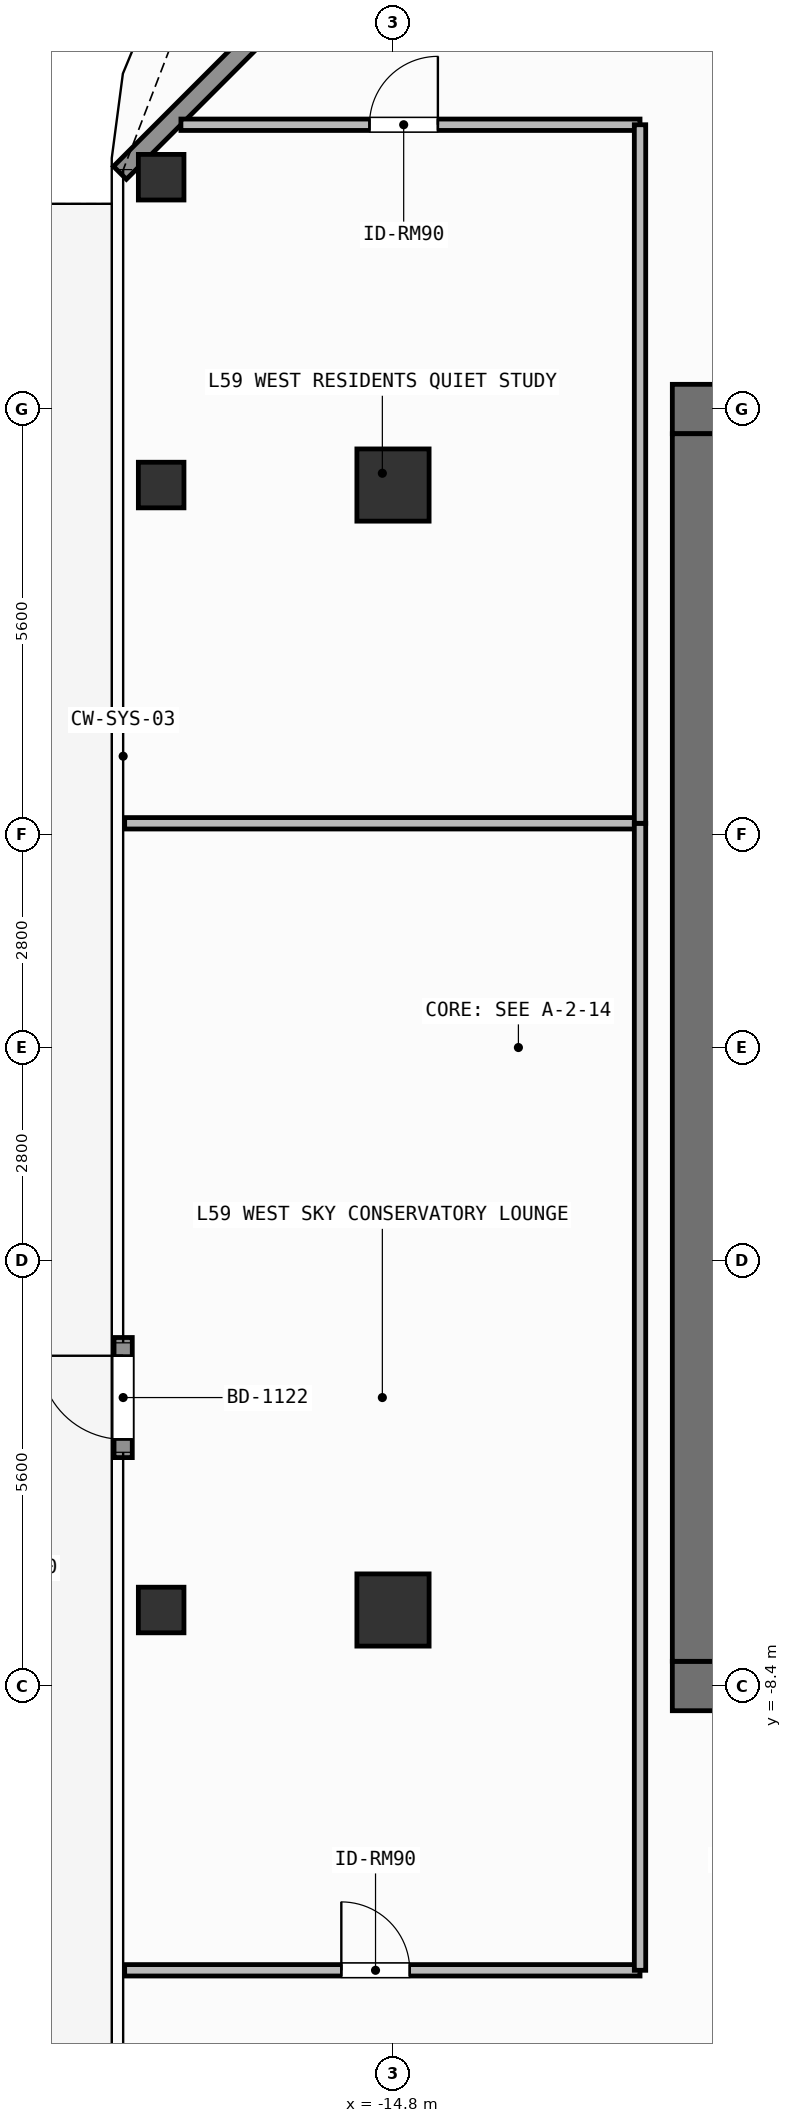
"""IFC4 building model, lengths in metres.
Left out: names, types, materials, properties, quantities, classifications, styles, units other than length and angle.
Written with IfcOpenShell. Run it as: python <this file> out.ifc"""

import sys

from ifc_helpers import new_model, si_unit, direction, frame, frame_2d, origin, origin_2d, place, context, subcontext, project, spatial, rectangle, hollow_rectangle, extrude, element, fill, save


model = new_model("IFC4")
c1 = context("Model", 3, precision=1e-05, world=origin(), true_north=direction((0.0, 1.0)))
c2 = subcontext(c1, "Body", "Model", "MODEL_VIEW")
j1 = project(units=[si_unit("LENGTHUNIT", "METRE"), si_unit("PLANEANGLEUNIT", "RADIAN")], contexts=[c1])
p1 = place(None, origin())
s1 = spatial("IfcSite", under=j1, at=p1, CompositionType="ELEMENT")
p2 = place(p1, origin())
s2 = spatial("IfcBuilding", under=s1, at=p2, CompositionType="ELEMENT")
p3 = place(p2, frame((0.0, 0.0, 243.0)))
s3 = spatial("IfcBuildingStorey", under=s2, at=p3, CompositionType="ELEMENT", Elevation=243.0)
for number, where, z_axis, x_axis in (
    (1, (-11.125, -8.4, 0.0), (0.0, 0.0, 1.0), (1.0, 0.0, 0.0)),
    (2, (-11.125, 8.4, 0.0), (0.0, 0.0, 1.0), (1.0, 0.0, 0.0)),
):
    element("IfcWall", number, at=place(p3, frame(where, z_axis=z_axis, x_axis=x_axis)), inside=s3, PredefinedType="SHEAR", context=c2, shape_type="SweptSolid", body=[
        extrude(rectangle(XDim=1.425, YDim=0.65, at=frame_2d((0.712, 0.0))), origin(), (0.0, 0.0, 1.0), 3.9),
    ])
p4 = place(p3, frame((-10.8, -8.075, 0.0), z_axis=(0.0, 0.0, 1.0), x_axis=(0.0, 1.0, 0.0)))
e3 = element("IfcWall", 3, at=p4, inside=s3, PredefinedType="SHEAR", context=c2, shape_type="SweptSolid", body=[
    extrude(rectangle(XDim=16.15, YDim=0.65, at=frame_2d((8.075, 0.0))), origin(), (0.0, 0.0, 1.0), 3.9),
])
for number, where, z_axis, x_axis in (
    (4, (-14.8, -7.4, 0.0), (0.0, 0.0, 1.0), (1.0, 0.0, 0.0)),
    (5, (-14.8, 7.4, 0.0), (0.0, 0.0, 1.0), (1.0, 0.0, 0.0)),
):
    element("IfcColumn", number, at=place(p3, frame(where, z_axis=z_axis, x_axis=x_axis)), inside=s3, PredefinedType="COLUMN", context=c2, shape_type="SweptSolid", body=[
        extrude(rectangle(XDim=0.95, YDim=0.95, at=origin_2d()), origin(), (0.0, 0.0, 1.0), 3.9),
    ])
for number, where, z_axis, x_axis in (
    (6, (-17.85, 11.45, 0.0), (0.0, 0.0, 1.0), (1.0, 0.0, 0.0)),
    (7, (-17.85, -7.4, 0.0), (0.0, 0.0, 1.0), (1.0, 0.0, 0.0)),
    (8, (-17.85, 7.4, 0.0), (0.0, 0.0, 1.0), (1.0, 0.0, 0.0)),
):
    element("IfcColumn", number, at=place(p3, frame(where, z_axis=z_axis, x_axis=x_axis)), inside=s3, PredefinedType="COLUMN", context=c2, shape_type="SweptSolid", body=[
        extrude(hollow_rectangle(XDim=0.6, YDim=0.6, WallThickness=0.028, at=origin_2d()), origin(), (0.0, 0.0, 1.0), 3.9),
    ])
p5 = place(p3, frame((-18.35, -5.395, 0.0), z_axis=(0.0, 0.0, 1.0), x_axis=(0.0, 1.0, 0.0)))
e9 = element("IfcWall", 9, at=p5, inside=s3, PredefinedType="SOLIDWALL", context=c2, shape_type="SweptSolid", body=[
    extrude(rectangle(XDim=1.58, YDim=0.24, at=frame_2d((0.79, 0.0))), origin(), (0.0, 0.0, 1.0), 3.68),
])
p6 = place(p5, frame((0.24, 0.0, 0.0)))
e10 = element("IfcOpeningElement", 10, at=p6, cuts=e9, PredefinedType="OPENING", context=c2, shape_type="SweptSolid", body=[
    extrude(rectangle(XDim=1.1, YDim=2.2, at=frame_2d((0.55, 1.1))), frame((0.0, 0.13, 0.0), z_axis=(0.0, -1.0, 0.0), x_axis=(1.0, 0.0, 0.0)), (0.0, 0.0, 1.0), 0.26),
])
p7 = place(p3, frame((-18.392, 11.508, 0.0), z_axis=(0.0, 0.0, 1.0), x_axis=(0.707106781187, 0.707106781187, 0.0)))
e11 = element("IfcWall", 11, at=p7, inside=s3, PredefinedType="SOLIDWALL", context=c2, shape_type="SweptSolid", body=[
    extrude(rectangle(XDim=6.201, YDim=0.24, at=frame_2d((3.101, 0.0))), origin(), (0.0, 0.0, 1.0), 3.68),
])
p8 = place(p3, frame((-18.33, -12.14, 0.0), z_axis=(0.0, 0.0, 1.0), x_axis=(1.0, 0.0, 0.0)))
e12 = element("IfcWall", 12, at=p8, inside=s3, PredefinedType="PARTITIONING", context=c2, shape_type="SweptSolid", body=[
    extrude(rectangle(XDim=6.78, YDim=0.15, at=frame_2d((3.39, 0.0))), origin(), (0.0, 0.0, 1.0), 3.68),
])
p9 = place(p8, frame((2.85, 0.0, 0.0)))
e13 = element("IfcOpeningElement", 13, at=p9, cuts=e12, PredefinedType="OPENING", context=c2, shape_type="SweptSolid", body=[
    extrude(rectangle(XDim=0.9, YDim=2.1, at=frame_2d((0.45, 1.05))), frame((0.0, 0.085, 0.0), z_axis=(0.0, -1.0, 0.0), x_axis=(1.0, 0.0, 0.0)), (0.0, 0.0, 1.0), 0.17),
])
p10 = place(p3, frame((-17.59, 12.14, 0.0), z_axis=(0.0, 0.0, 1.0), x_axis=(1.0, 0.0, 0.0)))
e14 = element("IfcWall", 14, at=p10, inside=s3, PredefinedType="PARTITIONING", context=c2, shape_type="SweptSolid", body=[
    extrude(rectangle(XDim=6.04, YDim=0.15, at=frame_2d((3.02, 0.0))), origin(), (0.0, 0.0, 1.0), 3.68),
])
p11 = place(p10, frame((2.481, 0.0, 0.0)))
e15 = element("IfcOpeningElement", 15, at=p11, cuts=e14, PredefinedType="OPENING", context=c2, shape_type="SweptSolid", body=[
    extrude(rectangle(XDim=0.9, YDim=2.1, at=frame_2d((0.45, 1.05))), frame((0.0, 0.085, 0.0), z_axis=(0.0, -1.0, 0.0), x_axis=(1.0, 0.0, 0.0)), (0.0, 0.0, 1.0), 0.17),
])
p12 = place(p3, frame((-18.33, 2.95, 0.0), z_axis=(0.0, 0.0, 1.0), x_axis=(1.0, 0.0, 0.0)))
e16 = element("IfcWall", 16, at=p12, inside=s3, PredefinedType="PARTITIONING", context=c2, shape_type="SweptSolid", body=[
    extrude(rectangle(XDim=6.78, YDim=0.15, at=frame_2d((3.39, 0.0))), origin(), (0.0, 0.0, 1.0), 3.68),
])
p13 = place(p3, frame((-11.55, -12.14, 0.0), z_axis=(0.0, 0.0, 1.0), x_axis=(0.0, 1.0, 0.0)))
e17 = element("IfcWall", 17, at=p13, inside=s3, PredefinedType="PARTITIONING", context=c2, shape_type="SweptSolid", body=[
    extrude(rectangle(XDim=15.09, YDim=0.15, at=frame_2d((7.545, 0.0))), origin(), (0.0, 0.0, 1.0), 3.68),
])
p14 = place(p3, frame((-11.55, 2.95, 0.0), z_axis=(0.0, 0.0, 1.0), x_axis=(0.0, 1.0, 0.0)))
e18 = element("IfcWall", 18, at=p14, inside=s3, PredefinedType="PARTITIONING", context=c2, shape_type="SweptSolid", body=[
    extrude(rectangle(XDim=9.19, YDim=0.15, at=frame_2d((4.595, 0.0))), origin(), (0.0, 0.0, 1.0), 3.68),
])
p15 = place(p6, origin())
e19 = element("IfcDoor", 19, at=p15, inside=s3, OperationType="SINGLE_SWING_RIGHT", PredefinedType="DOOR", context=c2, shape_type="SweptSolid", body=[
    extrude(rectangle(XDim=1.1, YDim=2.2, at=frame_2d((0.55, 1.1))), frame((0.0, 0.025, 0.0), z_axis=(0.0, -1.0, 0.0), x_axis=(1.0, 0.0, 0.0)), (0.0, 0.0, 1.0), 0.05),
])
fill(e10, e19)
p16 = place(p9, origin())
e20 = element("IfcDoor", 20, at=p16, inside=s3, OperationType="SINGLE_SWING_LEFT", PredefinedType="DOOR", context=c2, shape_type="SweptSolid", body=[
    extrude(rectangle(XDim=0.9, YDim=2.1, at=frame_2d((0.45, 1.05))), frame((0.0, 0.025, 0.0), z_axis=(0.0, -1.0, 0.0), x_axis=(1.0, 0.0, 0.0)), (0.0, 0.0, 1.0), 0.05),
])
fill(e13, e20)
p17 = place(p11, origin())
e21 = element("IfcDoor", 21, at=p17, inside=s3, OperationType="SINGLE_SWING_RIGHT", PredefinedType="DOOR", context=c2, shape_type="SweptSolid", body=[
    extrude(rectangle(XDim=0.9, YDim=2.1, at=frame_2d((0.45, 1.05))), frame((0.0, 0.025, 0.0), z_axis=(0.0, -1.0, 0.0), x_axis=(1.0, 0.0, 0.0)), (0.0, 0.0, 1.0), 0.05),
])
fill(e15, e21)
save(model, sys.argv[1])
